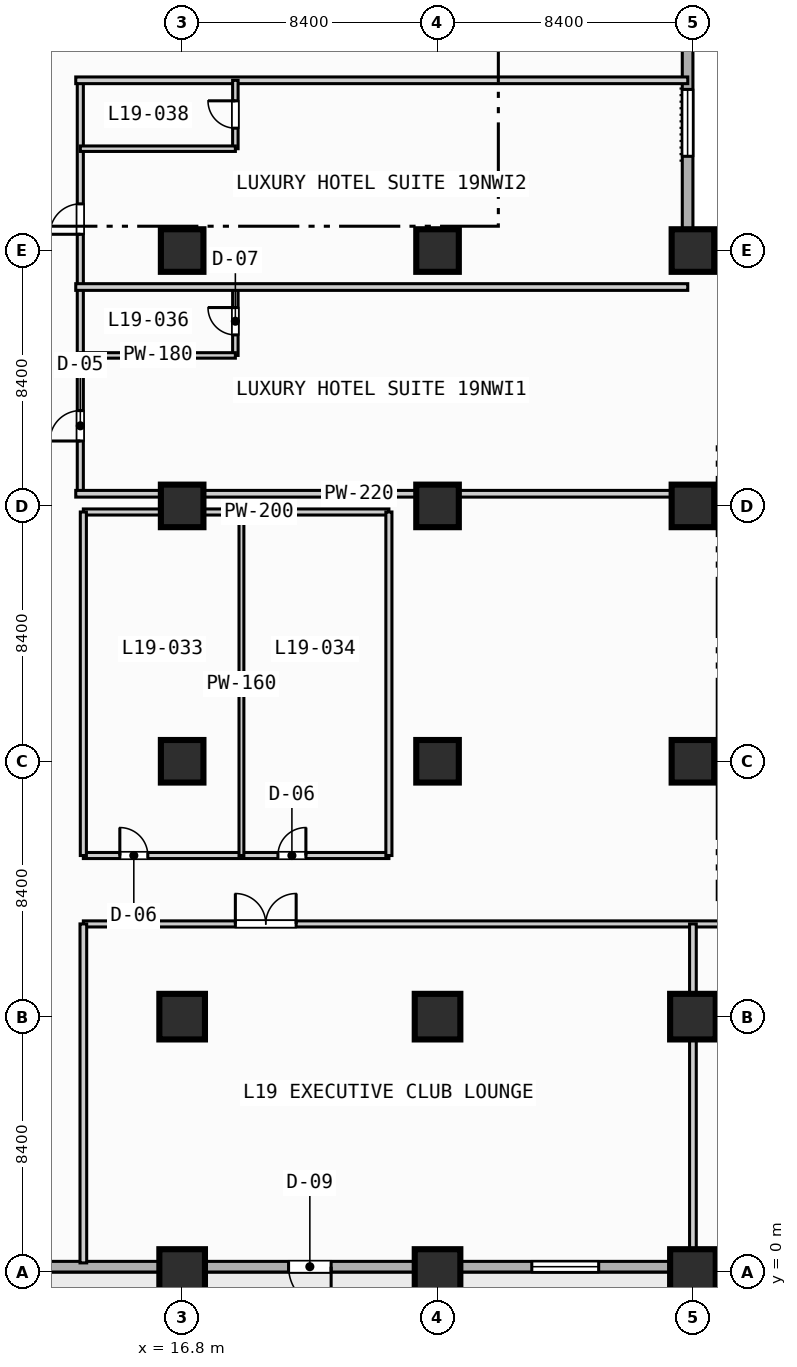
"""IFC4 building model, lengths in metres.
Left out: names, types, materials, properties, quantities, classifications, styles, units other than length and angle.
Written with IfcOpenShell. Run it as: python <this file> out.ifc"""

import sys

from ifc_helpers import new_model, si_unit, direction, frame, frame_2d, origin, origin_2d, place, context, subcontext, project, spatial, rectangle, extrude, element, fill, save


model = new_model("IFC4")
c1 = context("Model", 3, precision=1e-05, world=origin(), true_north=direction((0.0, 1.0)))
c2 = subcontext(c1, "Body", "Model", "MODEL_VIEW")
j1 = project(units=[si_unit("LENGTHUNIT", "METRE"), si_unit("PLANEANGLEUNIT", "RADIAN")], contexts=[c1])
p1 = place(None, origin())
s1 = spatial("IfcSite", under=j1, at=p1, CompositionType="ELEMENT")
p2 = place(p1, origin())
s2 = spatial("IfcBuilding", under=s1, at=p2, CompositionType="ELEMENT")
p3 = place(p2, frame((0.0, 0.0, 81.4)))
s3 = spatial("IfcBuildingStorey", under=s2, at=p3, CompositionType="ELEMENT", Elevation=81.4)
for number, where, z_axis, x_axis in (
    (1, (16.8, 0.0, 0.0), (0.0, 0.0, 1.0), (1.0, 0.0, 0.0)),
    (2, (16.8, 8.4, 0.0), (0.0, 0.0, 1.0), (1.0, 0.0, 0.0)),
):
    element("IfcColumn", number, at=place(p3, frame(where, z_axis=z_axis, x_axis=x_axis)), inside=s3, PredefinedType="COLUMN", context=c2, shape_type="SweptSolid", body=[
        extrude(rectangle(XDim=1.5, YDim=1.5, at=origin_2d()), origin(), (0.0, 0.0, 1.0), 3.8),
    ])
for number, where, z_axis, x_axis in (
    (3, (16.8, 16.8, 0.0), (0.0, 0.0, 1.0), (1.0, 0.0, 0.0)),
    (4, (16.8, 25.2, 0.0), (0.0, 0.0, 1.0), (1.0, 0.0, 0.0)),
    (5, (16.8, 33.6, 0.0), (0.0, 0.0, 1.0), (1.0, 0.0, 0.0)),
):
    element("IfcColumn", number, at=place(p3, frame(where, z_axis=z_axis, x_axis=x_axis)), inside=s3, PredefinedType="COLUMN", context=c2, shape_type="SweptSolid", body=[
        extrude(rectangle(XDim=1.4, YDim=1.4, at=origin_2d()), origin(), (0.0, 0.0, 1.0), 3.8),
    ])
for number, where, z_axis, x_axis in (
    (6, (25.2, 0.0, 0.0), (0.0, 0.0, 1.0), (1.0, 0.0, 0.0)),
    (7, (25.2, 8.4, 0.0), (0.0, 0.0, 1.0), (1.0, 0.0, 0.0)),
):
    element("IfcColumn", number, at=place(p3, frame(where, z_axis=z_axis, x_axis=x_axis)), inside=s3, PredefinedType="COLUMN", context=c2, shape_type="SweptSolid", body=[
        extrude(rectangle(XDim=1.5, YDim=1.5, at=origin_2d()), origin(), (0.0, 0.0, 1.0), 3.8),
    ])
for number, where, z_axis, x_axis in (
    (8, (25.2, 16.8, 0.0), (0.0, 0.0, 1.0), (1.0, 0.0, 0.0)),
    (9, (25.2, 25.2, 0.0), (0.0, 0.0, 1.0), (1.0, 0.0, 0.0)),
    (10, (25.2, 33.6, 0.0), (0.0, 0.0, 1.0), (1.0, 0.0, 0.0)),
):
    element("IfcColumn", number, at=place(p3, frame(where, z_axis=z_axis, x_axis=x_axis)), inside=s3, PredefinedType="COLUMN", context=c2, shape_type="SweptSolid", body=[
        extrude(rectangle(XDim=1.4, YDim=1.4, at=origin_2d()), origin(), (0.0, 0.0, 1.0), 3.8),
    ])
for number, where, z_axis, x_axis in (
    (11, (33.6, 0.0, 0.0), (0.0, 0.0, 1.0), (1.0, 0.0, 0.0)),
    (12, (33.6, 8.4, 0.0), (0.0, 0.0, 1.0), (1.0, 0.0, 0.0)),
):
    element("IfcColumn", number, at=place(p3, frame(where, z_axis=z_axis, x_axis=x_axis)), inside=s3, PredefinedType="COLUMN", context=c2, shape_type="SweptSolid", body=[
        extrude(rectangle(XDim=1.5, YDim=1.5, at=origin_2d()), origin(), (0.0, 0.0, 1.0), 3.8),
    ])
for number, where, z_axis, x_axis in (
    (13, (33.6, 16.8, 0.0), (0.0, 0.0, 1.0), (1.0, 0.0, 0.0)),
    (14, (33.6, 25.2, 0.0), (0.0, 0.0, 1.0), (1.0, 0.0, 0.0)),
    (15, (33.6, 33.6, 0.0), (0.0, 0.0, 1.0), (1.0, 0.0, 0.0)),
):
    element("IfcColumn", number, at=place(p3, frame(where, z_axis=z_axis, x_axis=x_axis)), inside=s3, PredefinedType="COLUMN", context=c2, shape_type="SweptSolid", body=[
        extrude(rectangle(XDim=1.4, YDim=1.4, at=origin_2d()), origin(), (0.0, 0.0, 1.0), 3.8),
    ])
p4 = place(p3, frame((33.425, 89.225, 0.0), z_axis=(0.0, 0.0, 1.0), x_axis=(0.0, -1.0, 0.0)))
e16 = element("IfcWall", 16, at=p4, inside=s3, PredefinedType="STANDARD", context=c2, shape_type="SweptSolid", body=[
    extrude(rectangle(XDim=55.8, YDim=0.35, at=frame_2d((27.9, 0.0))), origin(), (0.0, 0.0, 1.0), 3.55),
])
p5 = place(p4, frame((50.325, 0.0, 0.85)))
e17 = element("IfcOpeningElement", 17, at=p5, cuts=e16, PredefinedType="OPENING", context=c2, shape_type="SweptSolid", body=[
    extrude(rectangle(XDim=2.2, YDim=1.8, at=frame_2d((1.1, 0.9))), frame((0.0, 0.185, 0.0), z_axis=(0.0, -1.0, 0.0), x_axis=(1.0, 0.0, 0.0)), (0.0, 0.0, 1.0), 0.37),
])
p6 = place(p3, frame((33.425, 33.425, 0.0), z_axis=(0.0, 0.0, 1.0), x_axis=(1.0, 0.0, 0.0)))
e18 = element("IfcWall", 18, at=p6, inside=s3, PredefinedType="STANDARD", context=c2, shape_type="SweptSolid", body=[
    extrude(rectangle(XDim=55.8, YDim=0.35, at=frame_2d((27.9, 0.0))), origin(), (0.0, 0.0, 1.0), 3.55),
])
p7 = place(p6, frame((12.075, 0.0, 0.0)))
e19 = element("IfcOpeningElement", 19, at=p7, cuts=e18, PredefinedType="OPENING", context=c2, shape_type="SweptSolid", body=[
    extrude(rectangle(XDim=1.4, YDim=2.2, at=frame_2d((0.7, 1.1))), frame((0.0, 0.185, 0.0), z_axis=(0.0, -1.0, 0.0), x_axis=(1.0, 0.0, 0.0)), (0.0, 0.0, 1.0), 0.37),
])
p8 = place(p3, frame((89.225, 0.175, 0.0), z_axis=(0.0, 0.0, 1.0), x_axis=(-1.0, 0.0, 0.0)))
e20 = element("IfcWall", 20, at=p8, inside=s3, PredefinedType="STANDARD", context=c2, shape_type="SweptSolid", body=[
    extrude(rectangle(XDim=86.05, YDim=0.35, at=frame_2d((43.025, 0.0))), origin(), (0.0, 0.0, 1.0), 3.55),
])
p9 = place(p8, frame((67.525, 0.0, 0.0)))
e21 = element("IfcOpeningElement", 21, at=p9, cuts=e20, PredefinedType="OPENING", context=c2, shape_type="SweptSolid", body=[
    extrude(rectangle(XDim=1.4, YDim=2.2, at=frame_2d((0.7, 1.1))), frame((0.0, 0.185, 0.0), z_axis=(0.0, -1.0, 0.0), x_axis=(1.0, 0.0, 0.0)), (0.0, 0.0, 1.0), 0.37),
])
p10 = place(p8, frame((58.725, 0.0, 0.85)))
e22 = element("IfcOpeningElement", 22, at=p10, cuts=e20, PredefinedType="OPENING", context=c2, shape_type="SweptSolid", body=[
    extrude(rectangle(XDim=2.2, YDim=1.8, at=frame_2d((1.1, 0.9))), frame((0.0, 0.185, 0.0), z_axis=(0.0, -1.0, 0.0), x_axis=(1.0, 0.0, 0.0)), (0.0, 0.0, 1.0), 0.37),
])
p11 = place(p8, frame((50.325, 0.0, 0.85)))
e23 = element("IfcOpeningElement", 23, at=p11, cuts=e20, PredefinedType="OPENING", context=c2, shape_type="SweptSolid", body=[
    extrude(rectangle(XDim=2.2, YDim=1.8, at=frame_2d((1.1, 0.9))), frame((0.0, 0.185, 0.0), z_axis=(0.0, -1.0, 0.0), x_axis=(1.0, 0.0, 0.0)), (0.0, 0.0, 1.0), 0.37),
])
p12 = place(p8, frame((41.925, 0.0, 0.85)))
e24 = element("IfcOpeningElement", 24, at=p12, cuts=e20, PredefinedType="OPENING", context=c2, shape_type="SweptSolid", body=[
    extrude(rectangle(XDim=2.2, YDim=1.8, at=frame_2d((1.1, 0.9))), frame((0.0, 0.185, 0.0), z_axis=(0.0, -1.0, 0.0), x_axis=(1.0, 0.0, 0.0)), (0.0, 0.0, 1.0), 0.37),
])
p13 = place(p8, frame((27.575, 0.0, 0.85)))
e25 = element("IfcOpeningElement", 25, at=p13, cuts=e20, PredefinedType="OPENING", context=c2, shape_type="SweptSolid", body=[
    extrude(rectangle(XDim=1.8, YDim=1.8, at=frame_2d((0.9, 0.9))), frame((0.0, 0.185, 0.0), z_axis=(0.0, -1.0, 0.0), x_axis=(1.0, 0.0, 0.0)), (0.0, 0.0, 1.0), 0.37),
])
p14 = place(p8, frame((19.175, 0.0, 0.85)))
e26 = element("IfcOpeningElement", 26, at=p14, cuts=e20, PredefinedType="OPENING", context=c2, shape_type="SweptSolid", body=[
    extrude(rectangle(XDim=1.8, YDim=1.8, at=frame_2d((0.9, 0.9))), frame((0.0, 0.185, 0.0), z_axis=(0.0, -1.0, 0.0), x_axis=(1.0, 0.0, 0.0)), (0.0, 0.0, 1.0), 0.37),
])
p15 = place(p8, frame((10.775, 0.0, 0.85)))
e27 = element("IfcOpeningElement", 27, at=p15, cuts=e20, PredefinedType="OPENING", context=c2, shape_type="SweptSolid", body=[
    extrude(rectangle(XDim=1.8, YDim=1.8, at=frame_2d((0.9, 0.9))), frame((0.0, 0.185, 0.0), z_axis=(0.0, -1.0, 0.0), x_axis=(1.0, 0.0, 0.0)), (0.0, 0.0, 1.0), 0.37),
])
p16 = place(p8, frame((2.425, 0.0, 0.85)))
e28 = element("IfcOpeningElement", 28, at=p16, cuts=e20, PredefinedType="OPENING", context=c2, shape_type="SweptSolid", body=[
    extrude(rectangle(XDim=1.8, YDim=1.8, at=frame_2d((0.9, 0.9))), frame((0.0, 0.185, 0.0), z_axis=(0.0, -1.0, 0.0), x_axis=(1.0, 0.0, 0.0)), (0.0, 0.0, 1.0), 0.37),
])
p17 = place(p3, frame((13.55, 13.7, 0.0), z_axis=(0.0, 0.0, 1.0), x_axis=(1.0, 0.0, 0.0)))
e29 = element("IfcWall", 29, at=p17, inside=s3, PredefinedType="PARTITIONING", context=c2, shape_type="SweptSolid", body=[
    extrude(rectangle(XDim=10.05, YDim=0.2, at=frame_2d((5.025, 0.0))), origin(), (0.0, 0.0, 1.0), 3.55),
])
p18 = place(p17, frame((1.2, 0.0, 0.0)))
e30 = element("IfcOpeningElement", 30, at=p18, cuts=e29, PredefinedType="OPENING", context=c2, shape_type="SweptSolid", body=[
    extrude(rectangle(XDim=0.92, YDim=2.1, at=frame_2d((0.46, 1.05))), frame((0.0, 0.11, 0.0), z_axis=(0.0, -1.0, 0.0), x_axis=(1.0, 0.0, 0.0)), (0.0, 0.0, 1.0), 0.22),
])
p19 = place(p17, frame((6.4, 0.0, 0.0)))
e31 = element("IfcOpeningElement", 31, at=p19, cuts=e29, PredefinedType="OPENING", context=c2, shape_type="SweptSolid", body=[
    extrude(rectangle(XDim=0.92, YDim=2.1, at=frame_2d((0.46, 1.05))), frame((0.0, 0.11, 0.0), z_axis=(0.0, -1.0, 0.0), x_axis=(1.0, 0.0, 0.0)), (0.0, 0.0, 1.0), 0.22),
])
p20 = place(p3, frame((18.75, 13.7, 0.0), z_axis=(0.0, 0.0, 1.0), x_axis=(0.0, 1.0, 0.0)))
e32 = element("IfcWall", 32, at=p20, inside=s3, PredefinedType="PARTITIONING", context=c2, shape_type="SweptSolid", body=[
    extrude(rectangle(XDim=11.3, YDim=0.16, at=frame_2d((5.65, 0.0))), origin(), (0.0, 0.0, 1.0), 3.55),
])
p21 = place(p3, frame((13.55, 25.0, 0.0), z_axis=(0.0, 0.0, 1.0), x_axis=(1.0, 0.0, 0.0)))
e33 = element("IfcWall", 33, at=p21, inside=s3, PredefinedType="PARTITIONING", context=c2, shape_type="SweptSolid", body=[
    extrude(rectangle(XDim=10.05, YDim=0.2, at=frame_2d((5.025, 0.0))), origin(), (0.0, 0.0, 1.0), 2.8),
])
for number, where, z_axis, x_axis in (
    (34, (13.55, 13.7, 0.0), (0.0, 0.0, 1.0), (0.0, 1.0, 0.0)),
    (35, (23.6, 13.7, 0.0), (0.0, 0.0, 1.0), (0.0, 1.0, 0.0)),
):
    element("IfcWall", number, at=place(p3, frame(where, z_axis=z_axis, x_axis=x_axis)), inside=s3, PredefinedType="PARTITIONING", context=c2, shape_type="SweptSolid", body=[
        extrude(rectangle(XDim=11.3, YDim=0.2, at=frame_2d((5.65, 0.0))), origin(), (0.0, 0.0, 1.0), 3.55),
    ])
p22 = place(p3, frame((13.45, 25.6, 0.0), z_axis=(0.0, 0.0, 1.0), x_axis=(0.0, 1.0, 0.0)))
e36 = element("IfcWall", 36, at=p22, inside=s3, PredefinedType="PARTITIONING", context=c2, shape_type="SweptSolid", body=[
    extrude(rectangle(XDim=13.6, YDim=0.2, at=frame_2d((6.8, 0.0))), origin(), (0.0, 0.0, 1.0), 3.55),
])
p23 = place(p22, frame((1.735, 0.0, 0.0)))
e37 = element("IfcOpeningElement", 37, at=p23, cuts=e36, PredefinedType="OPENING", context=c2, shape_type="SweptSolid", body=[
    extrude(rectangle(XDim=1.0, YDim=2.15, at=frame_2d((0.5, 1.075))), frame((0.0, 0.11, 0.0), z_axis=(0.0, -1.0, 0.0), x_axis=(1.0, 0.0, 0.0)), (0.0, 0.0, 1.0), 0.22),
])
p24 = place(p22, frame((8.535, 0.0, 0.0)))
e38 = element("IfcOpeningElement", 38, at=p24, cuts=e36, PredefinedType="OPENING", context=c2, shape_type="SweptSolid", body=[
    extrude(rectangle(XDim=1.0, YDim=2.15, at=frame_2d((0.5, 1.075))), frame((0.0, 0.11, 0.0), z_axis=(0.0, -1.0, 0.0), x_axis=(1.0, 0.0, 0.0)), (0.0, 0.0, 1.0), 0.22),
])
p25 = place(p3, frame((13.3, 25.6, 0.0), z_axis=(0.0, 0.0, 1.0), x_axis=(1.0, 0.0, 0.0)))
e39 = element("IfcWall", 39, at=p25, inside=s3, PredefinedType="PARTITIONING", context=c2, shape_type="SweptSolid", body=[
    extrude(rectangle(XDim=20.13, YDim=0.22, at=frame_2d((10.065, 0.0))), origin(), (0.0, 0.0, 1.0), 3.55),
])
p26 = place(p3, frame((18.55, 30.15, 0.0), z_axis=(0.0, 0.0, 1.0), x_axis=(0.0, 1.0, 0.0)))
e40 = element("IfcWall", 40, at=p26, inside=s3, PredefinedType="PLUMBINGWALL", context=c2, shape_type="SweptSolid", body=[
    extrude(rectangle(XDim=2.25, YDim=0.18, at=frame_2d((1.125, 0.0))), origin(), (0.0, 0.0, 1.0), 3.55),
])
p27 = place(p26, frame((0.675, 0.0, 0.0)))
e41 = element("IfcOpeningElement", 41, at=p27, cuts=e40, PredefinedType="OPENING", context=c2, shape_type="SweptSolid", body=[
    extrude(rectangle(XDim=0.9, YDim=2.1, at=frame_2d((0.45, 1.05))), frame((0.0, 0.1, 0.0), z_axis=(0.0, -1.0, 0.0), x_axis=(1.0, 0.0, 0.0)), (0.0, 0.0, 1.0), 0.2),
])
p28 = place(p3, frame((13.45, 30.15, 0.0), z_axis=(0.0, 0.0, 1.0), x_axis=(1.0, 0.0, 0.0)))
e42 = element("IfcWall", 42, at=p28, inside=s3, PredefinedType="PLUMBINGWALL", context=c2, shape_type="SweptSolid", body=[
    extrude(rectangle(XDim=5.1, YDim=0.18, at=frame_2d((2.55, 0.0))), origin(), (0.0, 0.0, 1.0), 3.55),
])
for number, where, z_axis, x_axis in (
    (43, (13.3, 32.4, 0.0), (0.0, 0.0, 1.0), (1.0, 0.0, 0.0)),
    (44, (13.3, 39.2, 0.0), (0.0, 0.0, 1.0), (1.0, 0.0, 0.0)),
):
    element("IfcWall", number, at=place(p3, frame(where, z_axis=z_axis, x_axis=x_axis)), inside=s3, PredefinedType="PARTITIONING", context=c2, shape_type="SweptSolid", body=[
        extrude(rectangle(XDim=20.13, YDim=0.22, at=frame_2d((10.065, 0.0))), origin(), (0.0, 0.0, 1.0), 3.55),
    ])
p29 = place(p3, frame((18.55, 36.95, 0.0), z_axis=(0.0, 0.0, 1.0), x_axis=(0.0, 1.0, 0.0)))
e45 = element("IfcWall", 45, at=p29, inside=s3, PredefinedType="PLUMBINGWALL", context=c2, shape_type="SweptSolid", body=[
    extrude(rectangle(XDim=2.25, YDim=0.18, at=frame_2d((1.125, 0.0))), origin(), (0.0, 0.0, 1.0), 3.55),
])
p30 = place(p29, frame((0.675, 0.0, 0.0)))
e46 = element("IfcOpeningElement", 46, at=p30, cuts=e45, PredefinedType="OPENING", context=c2, shape_type="SweptSolid", body=[
    extrude(rectangle(XDim=0.9, YDim=2.1, at=frame_2d((0.45, 1.05))), frame((0.0, 0.1, 0.0), z_axis=(0.0, -1.0, 0.0), x_axis=(1.0, 0.0, 0.0)), (0.0, 0.0, 1.0), 0.2),
])
p31 = place(p3, frame((13.45, 36.95, 0.0), z_axis=(0.0, 0.0, 1.0), x_axis=(1.0, 0.0, 0.0)))
e47 = element("IfcWall", 47, at=p31, inside=s3, PredefinedType="PLUMBINGWALL", context=c2, shape_type="SweptSolid", body=[
    extrude(rectangle(XDim=5.1, YDim=0.18, at=frame_2d((2.55, 0.0))), origin(), (0.0, 0.0, 1.0), 3.55),
])
p32 = place(p3, frame((13.55, 11.45, 0.0), z_axis=(0.0, 0.0, 1.0), x_axis=(1.0, 0.0, 0.0)))
e48 = element("IfcWall", 48, at=p32, inside=s3, PredefinedType="PARTITIONING", context=c2, shape_type="SweptSolid", body=[
    extrude(rectangle(XDim=42.05, YDim=0.2, at=frame_2d((21.025, 0.0))), origin(), (0.0, 0.0, 1.0), 3.55),
])
p33 = place(p32, frame((5.0, 0.0, 0.0)))
e49 = element("IfcOpeningElement", 49, at=p33, cuts=e48, PredefinedType="OPENING", context=c2, shape_type="SweptSolid", body=[
    extrude(rectangle(XDim=2.0, YDim=2.15, at=frame_2d((1.0, 1.075))), frame((0.0, 0.11, 0.0), z_axis=(0.0, -1.0, 0.0), x_axis=(1.0, 0.0, 0.0)), (0.0, 0.0, 1.0), 0.22),
])
p34 = place(p32, frame((24.0, 0.0, 0.0)))
e50 = element("IfcOpeningElement", 50, at=p34, cuts=e48, PredefinedType="OPENING", context=c2, shape_type="SweptSolid", body=[
    extrude(rectangle(XDim=2.0, YDim=2.15, at=frame_2d((1.0, 1.075))), frame((0.0, 0.11, 0.0), z_axis=(0.0, -1.0, 0.0), x_axis=(1.0, 0.0, 0.0)), (0.0, 0.0, 1.0), 0.22),
])
p35 = place(p3, frame((13.55, 0.3, 0.0), z_axis=(0.0, 0.0, 1.0), x_axis=(0.0, 1.0, 0.0)))
e51 = element("IfcWall", 51, at=p35, inside=s3, PredefinedType="PARTITIONING", context=c2, shape_type="SweptSolid", body=[
    extrude(rectangle(XDim=11.15, YDim=0.22, at=frame_2d((5.575, 0.0))), origin(), (0.0, 0.0, 1.0), 3.55),
])
p36 = place(p3, frame((33.6, 0.3, 0.0), z_axis=(0.0, 0.0, 1.0), x_axis=(0.0, 1.0, 0.0)))
e52 = element("IfcWall", 52, at=p36, inside=s3, PredefinedType="PARTITIONING", context=c2, shape_type="SweptSolid", body=[
    extrude(rectangle(XDim=11.15, YDim=0.22, at=frame_2d((5.575, 0.0))), origin(), (0.0, 0.0, 1.0), 2.8),
])
p37 = place(p5, origin())
e53 = element("IfcWindow", 53, at=p37, inside=s3, PartitioningType="SINGLE_PANEL", PredefinedType="WINDOW", context=c2, shape_type="SweptSolid", body=[
    extrude(rectangle(XDim=2.2, YDim=1.8, at=frame_2d((1.1, 0.9))), frame((0.0, 0.03, 0.0), z_axis=(0.0, -1.0, 0.0), x_axis=(1.0, 0.0, 0.0)), (0.0, 0.0, 1.0), 0.06),
])
fill(e17, e53)
p38 = place(p9, origin())
e54 = element("IfcDoor", 54, at=p38, inside=s3, OperationType="SINGLE_SWING_LEFT", PredefinedType="DOOR", context=c2, shape_type="SweptSolid", body=[
    extrude(rectangle(XDim=1.4, YDim=2.2, at=frame_2d((0.7, 1.1))), frame((0.0, 0.025, 0.0), z_axis=(0.0, -1.0, 0.0), x_axis=(1.0, 0.0, 0.0)), (0.0, 0.0, 1.0), 0.05),
])
fill(e21, e54)
p39 = place(p10, origin())
e55 = element("IfcWindow", 55, at=p39, inside=s3, PartitioningType="SINGLE_PANEL", PredefinedType="WINDOW", context=c2, shape_type="SweptSolid", body=[
    extrude(rectangle(XDim=2.2, YDim=1.8, at=frame_2d((1.1, 0.9))), frame((0.0, 0.03, 0.0), z_axis=(0.0, -1.0, 0.0), x_axis=(1.0, 0.0, 0.0)), (0.0, 0.0, 1.0), 0.06),
])
fill(e22, e55)
p40 = place(p18, origin())
e56 = element("IfcDoor", 56, at=p40, inside=s3, OperationType="SINGLE_SWING_LEFT", PredefinedType="DOOR", context=c2, shape_type="SweptSolid", body=[
    extrude(rectangle(XDim=0.92, YDim=2.1, at=frame_2d((0.46, 1.05))), frame((0.0, 0.025, 0.0), z_axis=(0.0, -1.0, 0.0), x_axis=(1.0, 0.0, 0.0)), (0.0, 0.0, 1.0), 0.05),
])
fill(e30, e56)
p41 = place(p19, origin())
e57 = element("IfcDoor", 57, at=p41, inside=s3, OperationType="SINGLE_SWING_RIGHT", PredefinedType="DOOR", context=c2, shape_type="SweptSolid", body=[
    extrude(rectangle(XDim=0.92, YDim=2.1, at=frame_2d((0.46, 1.05))), frame((0.0, 0.025, 0.0), z_axis=(0.0, -1.0, 0.0), x_axis=(1.0, 0.0, 0.0)), (0.0, 0.0, 1.0), 0.05),
])
fill(e31, e57)
p42 = place(p23, origin())
e58 = element("IfcDoor", 58, at=p42, inside=s3, OperationType="SINGLE_SWING_LEFT", PredefinedType="DOOR", context=c2, shape_type="SweptSolid", body=[
    extrude(rectangle(XDim=1.0, YDim=2.15, at=frame_2d((0.5, 1.075))), frame((0.0, 0.025, 0.0), z_axis=(0.0, -1.0, 0.0), x_axis=(1.0, 0.0, 0.0)), (0.0, 0.0, 1.0), 0.05),
])
fill(e37, e58)
p43 = place(p24, origin())
e59 = element("IfcDoor", 59, at=p43, inside=s3, OperationType="SINGLE_SWING_LEFT", PredefinedType="DOOR", context=c2, shape_type="SweptSolid", body=[
    extrude(rectangle(XDim=1.0, YDim=2.15, at=frame_2d((0.5, 1.075))), frame((0.0, 0.025, 0.0), z_axis=(0.0, -1.0, 0.0), x_axis=(1.0, 0.0, 0.0)), (0.0, 0.0, 1.0), 0.05),
])
fill(e38, e59)
p44 = place(p27, origin())
e60 = element("IfcDoor", 60, at=p44, inside=s3, OperationType="SINGLE_SWING_RIGHT", PredefinedType="DOOR", context=c2, shape_type="SweptSolid", body=[
    extrude(rectangle(XDim=0.9, YDim=2.1, at=frame_2d((0.45, 1.05))), frame((0.0, 0.025, 0.0), z_axis=(0.0, -1.0, 0.0), x_axis=(1.0, 0.0, 0.0)), (0.0, 0.0, 1.0), 0.05),
])
fill(e41, e60)
p45 = place(p30, origin())
e61 = element("IfcDoor", 61, at=p45, inside=s3, OperationType="SINGLE_SWING_RIGHT", PredefinedType="DOOR", context=c2, shape_type="SweptSolid", body=[
    extrude(rectangle(XDim=0.9, YDim=2.1, at=frame_2d((0.45, 1.05))), frame((0.0, 0.025, 0.0), z_axis=(0.0, -1.0, 0.0), x_axis=(1.0, 0.0, 0.0)), (0.0, 0.0, 1.0), 0.05),
])
fill(e46, e61)
p46 = place(p33, origin())
e62 = element("IfcDoor", 62, at=p46, inside=s3, OperationType="SINGLE_SWING_LEFT", PredefinedType="DOOR", context=c2, shape_type="SweptSolid", body=[
    extrude(rectangle(XDim=2.0, YDim=2.15, at=frame_2d((1.0, 1.075))), frame((0.0, 0.025, 0.0), z_axis=(0.0, -1.0, 0.0), x_axis=(1.0, 0.0, 0.0)), (0.0, 0.0, 1.0), 0.05),
])
fill(e49, e62)
save(model, sys.argv[1])
